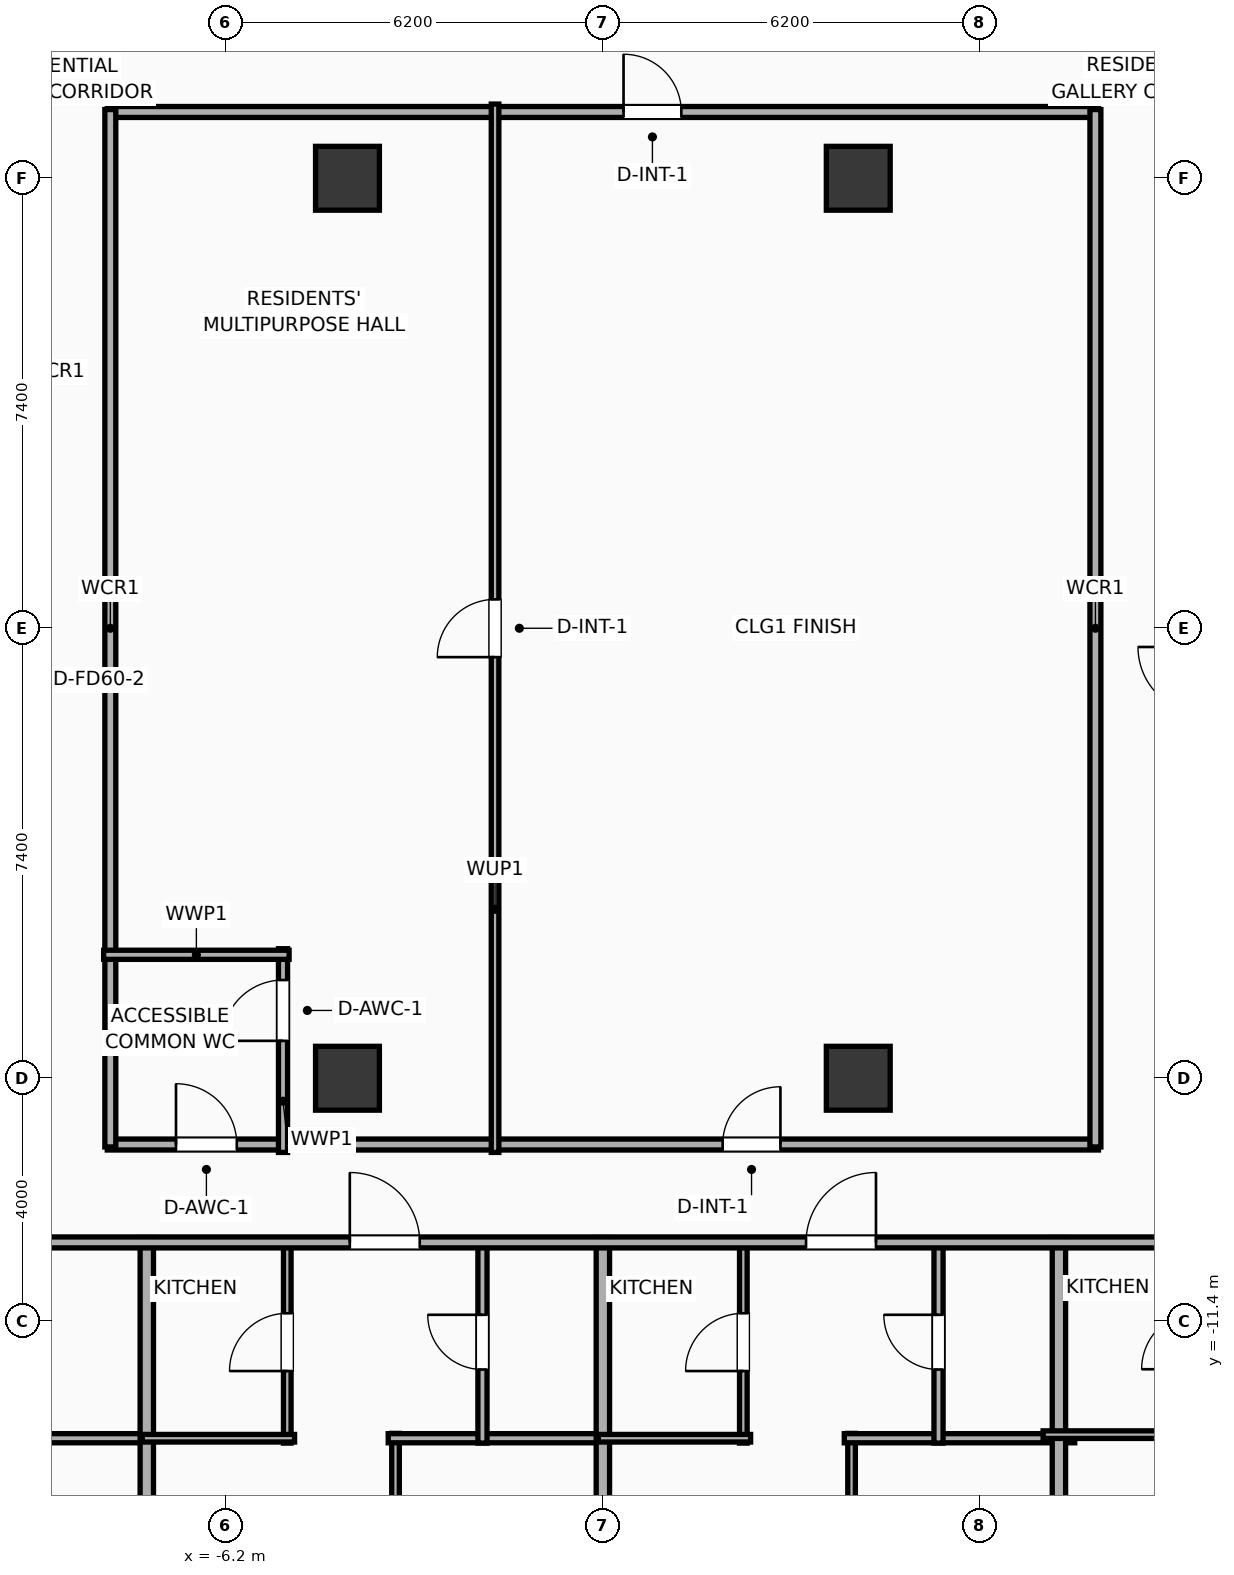
"""IFC4 building model, lengths in metres.
Left out: names, types, materials, properties, quantities, classifications, styles, units other than length and angle.
Written with IfcOpenShell. Run it as: python <this file> out.ifc"""

import sys

from ifc_helpers import new_model, si_unit, direction, frame, frame_2d, origin, origin_2d, place, context, subcontext, project, spatial, rectangle, extrude, element, fill, save


model = new_model("IFC4")
c1 = context("Model", 3, precision=1e-05, world=origin(), true_north=direction((0.0, 1.0)))
c2 = subcontext(c1, "Body", "Model", "MODEL_VIEW")
j1 = project(units=[si_unit("LENGTHUNIT", "METRE"), si_unit("PLANEANGLEUNIT", "RADIAN")], contexts=[c1])
p1 = place(None, origin())
s1 = spatial("IfcSite", under=j1, at=p1, CompositionType="ELEMENT")
p2 = place(p1, origin())
s2 = spatial("IfcBuilding", under=s1, at=p2, CompositionType="ELEMENT")
p3 = place(p2, frame((0.0, 0.0, 113.1)))
s3 = spatial("IfcBuildingStorey", under=s2, at=p3, CompositionType="ELEMENT", Elevation=113.1)
for number, where, z_axis, x_axis in (
    (1, (-4.2, -7.4, 0.0), (0.0, 0.0, 1.0), (1.0, 0.0, 0.0)),
    (2, (-4.2, 7.4, 0.0), (0.0, 0.0, 1.0), (1.0, 0.0, 0.0)),
    (3, (4.2, -7.4, 0.0), (0.0, 0.0, 1.0), (1.0, 0.0, 0.0)),
    (4, (4.2, 7.4, 0.0), (0.0, 0.0, 1.0), (1.0, 0.0, 0.0)),
):
    element("IfcColumn", number, at=place(p3, frame(where, z_axis=z_axis, x_axis=x_axis)), inside=s3, PredefinedType="COLUMN", context=c2, shape_type="SweptSolid", body=[
        extrude(rectangle(XDim=1.05, YDim=1.05, at=origin_2d()), origin(), (0.0, 0.0, 1.0), 3.9),
    ])
p4 = place(p3, frame((-8.15, 8.49, 0.0), z_axis=(0.0, 0.0, 1.0), x_axis=(1.0, 0.0, 0.0)))
e5 = element("IfcWall", 5, at=p4, inside=s3, PredefinedType="PARTITIONING", context=c2, shape_type="SweptSolid", body=[
    extrude(rectangle(XDim=16.3, YDim=0.18, at=frame_2d((8.15, 0.0))), origin(), (0.0, 0.0, 1.0), 3.65),
])
p5 = place(p4, frame((8.49, 0.0, 0.0)))
e6 = element("IfcOpeningElement", 6, at=p5, cuts=e5, PredefinedType="OPENING", context=c2, shape_type="SweptSolid", body=[
    extrude(rectangle(XDim=0.95, YDim=2.05, at=frame_2d((0.475, 1.025))), frame((0.0, 0.1, 0.0), z_axis=(0.0, -1.0, 0.0), x_axis=(1.0, 0.0, 0.0)), (0.0, 0.0, 1.0), 0.2),
])
p6 = place(p3, frame((-8.15, -8.49, 0.0), z_axis=(0.0, 0.0, 1.0), x_axis=(1.0, 0.0, 0.0)))
e7 = element("IfcWall", 7, at=p6, inside=s3, PredefinedType="PARTITIONING", context=c2, shape_type="SweptSolid", body=[
    extrude(rectangle(XDim=16.3, YDim=0.18, at=frame_2d((8.15, 0.0))), origin(), (0.0, 0.0, 1.0), 3.65),
])
p7 = place(p6, frame((1.13, 0.0, 0.0)))
e8 = element("IfcOpeningElement", 8, at=p7, cuts=e7, PredefinedType="OPENING", context=c2, shape_type="SweptSolid", body=[
    extrude(rectangle(XDim=1.0, YDim=2.05, at=frame_2d((0.5, 1.025))), frame((0.0, 0.1, 0.0), z_axis=(0.0, -1.0, 0.0), x_axis=(1.0, 0.0, 0.0)), (0.0, 0.0, 1.0), 0.2),
])
p8 = place(p6, frame((10.12, 0.0, 0.0)))
e9 = element("IfcOpeningElement", 9, at=p8, cuts=e7, PredefinedType="OPENING", context=c2, shape_type="SweptSolid", body=[
    extrude(rectangle(XDim=0.95, YDim=2.05, at=frame_2d((0.475, 1.025))), frame((0.0, 0.1, 0.0), z_axis=(0.0, -1.0, 0.0), x_axis=(1.0, 0.0, 0.0)), (0.0, 0.0, 1.0), 0.2),
])
for number, where, z_axis, x_axis in (
    (10, (-8.1, -8.53, 0.0), (0.0, 0.0, 1.0), (0.0, 1.0, 0.0)),
    (11, (8.1, -8.53, 0.0), (0.0, 0.0, 1.0), (0.0, 1.0, 0.0)),
):
    element("IfcWall", number, at=place(p3, frame(where, z_axis=z_axis, x_axis=x_axis)), inside=s3, PredefinedType="PARTITIONING", context=c2, shape_type="SweptSolid", body=[
        extrude(rectangle(XDim=17.06, YDim=0.18, at=frame_2d((8.53, 0.0))), origin(), (0.0, 0.0, 1.0), 3.65),
    ])
p9 = place(p3, frame((-5.26, -8.62, 0.0), z_axis=(0.0, 0.0, 1.0), x_axis=(0.0, 1.0, 0.0)))
e12 = element("IfcWall", 12, at=p9, inside=s3, PredefinedType="PLUMBINGWALL", context=c2, shape_type="SweptSolid", body=[
    extrude(rectangle(XDim=3.35, YDim=0.15, at=frame_2d((1.675, 0.0))), origin(), (0.0, 0.0, 1.0), 3.65),
])
p10 = place(p9, frame((1.835, 0.0, 0.0)))
e13 = element("IfcOpeningElement", 13, at=p10, cuts=e12, PredefinedType="OPENING", context=c2, shape_type="SweptSolid", body=[
    extrude(rectangle(XDim=1.0, YDim=2.05, at=frame_2d((0.5, 1.025))), frame((0.0, 0.085, 0.0), z_axis=(0.0, -1.0, 0.0), x_axis=(1.0, 0.0, 0.0)), (0.0, 0.0, 1.0), 0.17),
])
p11 = place(p3, frame((-8.21, -5.37, 0.0), z_axis=(0.0, 0.0, 1.0), x_axis=(1.0, 0.0, 0.0)))
e14 = element("IfcWall", 14, at=p11, inside=s3, PredefinedType="PLUMBINGWALL", context=c2, shape_type="SweptSolid", body=[
    extrude(rectangle(XDim=3.05, YDim=0.15, at=frame_2d((1.525, 0.0))), origin(), (0.0, 0.0, 1.0), 3.65),
])
p12 = place(p3, frame((-1.773, -8.62, 0.0), z_axis=(0.0, 0.0, 1.0), x_axis=(0.0, 1.0, 0.0)))
e15 = element("IfcWall", 15, at=p12, inside=s3, PredefinedType="PARTITIONING", context=c2, shape_type="SweptSolid", body=[
    extrude(rectangle(XDim=17.24, YDim=0.125, at=frame_2d((8.62, 0.0))), origin(), (0.0, 0.0, 1.0), 3.65),
])
p13 = place(p12, frame((8.145, 0.0, 0.0)))
e16 = element("IfcOpeningElement", 16, at=p13, cuts=e15, PredefinedType="OPENING", context=c2, shape_type="SweptSolid", body=[
    extrude(rectangle(XDim=0.95, YDim=2.05, at=frame_2d((0.475, 1.025))), frame((0.0, 0.073, 0.0), z_axis=(0.0, -1.0, 0.0), x_axis=(1.0, 0.0, 0.0)), (0.0, 0.0, 1.0), 0.145),
])
p14 = place(p3, frame((-11.03, -13.32, 0.0), z_axis=(0.0, 0.0, 1.0), x_axis=(1.0, 0.0, 0.0)))
e17 = element("IfcWall", 17, at=p14, inside=s3, PredefinedType="PLUMBINGWALL", context=c2, shape_type="SweptSolid", body=[
    extrude(rectangle(XDim=3.605, YDim=0.15, at=frame_2d((1.802, 0.0))), origin(), (0.0, 0.0, 1.0), 3.65),
])
p15 = place(p3, frame((-7.5, -20.41, 0.0), z_axis=(0.0, 0.0, 1.0), x_axis=(0.0, 1.0, 0.0)))
e18 = element("IfcWall", 18, at=p15, inside=s3, PredefinedType="PARTITIONING", context=c2, shape_type="SweptSolid", body=[
    extrude(rectangle(XDim=10.39, YDim=0.22, at=frame_2d((5.195, 0.0))), origin(), (0.0, 0.0, 1.0), 3.65),
])
p16 = place(p3, frame((-3.41, -20.56, 0.0), z_axis=(0.0, 0.0, 1.0), x_axis=(0.0, 1.0, 0.0)))
e19 = element("IfcWall", 19, at=p16, inside=s3, PredefinedType="PARTITIONING", context=c2, shape_type="SweptSolid", body=[
    extrude(rectangle(XDim=7.32, YDim=0.125, at=frame_2d((3.66, 0.0))), origin(), (0.0, 0.0, 1.0), 3.04),
])
p17 = place(p16, frame((5.113, 0.0, 0.0)))
e20 = element("IfcOpeningElement", 20, at=p17, cuts=e19, PredefinedType="OPENING", context=c2, shape_type="SweptSolid", body=[
    extrude(rectangle(XDim=0.9, YDim=2.05, at=frame_2d((0.45, 1.025))), frame((0.0, 0.073, 0.0), z_axis=(0.0, -1.0, 0.0), x_axis=(1.0, 0.0, 0.0)), (0.0, 0.0, 1.0), 0.145),
])
p18 = place(p3, frame((-3.53, -13.32, 0.0), z_axis=(0.0, 0.0, 1.0), x_axis=(1.0, 0.0, 0.0)))
e21 = element("IfcWall", 21, at=p18, inside=s3, PredefinedType="PLUMBINGWALL", context=c2, shape_type="SweptSolid", body=[
    extrude(rectangle(XDim=3.605, YDim=0.15, at=frame_2d((1.802, 0.0))), origin(), (0.0, 0.0, 1.0), 3.65),
])
p19 = place(p3, frame((-5.19, -13.4, 0.0), z_axis=(0.0, 0.0, 1.0), x_axis=(0.0, 1.0, 0.0)))
e22 = element("IfcWall", 22, at=p19, inside=s3, PredefinedType="PARTITIONING", context=c2, shape_type="SweptSolid", body=[
    extrude(rectangle(XDim=3.32, YDim=0.125, at=frame_2d((1.66, 0.0))), origin(), (0.0, 0.0, 1.0), 3.65),
])
p20 = place(p19, frame((1.185, 0.0, 0.0)))
e23 = element("IfcOpeningElement", 23, at=p20, cuts=e22, PredefinedType="OPENING", context=c2, shape_type="SweptSolid", body=[
    extrude(rectangle(XDim=0.95, YDim=2.05, at=frame_2d((0.475, 1.025))), frame((0.0, 0.073, 0.0), z_axis=(0.0, -1.0, 0.0), x_axis=(1.0, 0.0, 0.0)), (0.0, 0.0, 1.0), 0.145),
])
p21 = place(p3, frame((-7.575, -13.32, 0.0), z_axis=(0.0, 0.0, 1.0), x_axis=(1.0, 0.0, 0.0)))
e24 = element("IfcWall", 24, at=p21, inside=s3, PredefinedType="PARTITIONING", context=c2, shape_type="SweptSolid", body=[
    extrude(rectangle(XDim=2.505, YDim=0.125, at=frame_2d((1.252, 0.0))), origin(), (0.0, 0.0, 1.0), 3.65),
])
p22 = place(p3, frame((-1.98, -13.4, 0.0), z_axis=(0.0, 0.0, 1.0), x_axis=(0.0, 1.0, 0.0)))
e25 = element("IfcWall", 25, at=p22, inside=s3, PredefinedType="PLUMBINGWALL", context=c2, shape_type="SweptSolid", body=[
    extrude(rectangle(XDim=3.32, YDim=0.15, at=frame_2d((1.66, 0.0))), origin(), (0.0, 0.0, 1.0), 3.65),
])
p23 = place(p22, frame((1.21, 0.0, 0.0)))
e26 = element("IfcOpeningElement", 26, at=p23, cuts=e25, PredefinedType="OPENING", context=c2, shape_type="SweptSolid", body=[
    extrude(rectangle(XDim=0.9, YDim=2.05, at=frame_2d((0.45, 1.025))), frame((0.0, 0.085, 0.0), z_axis=(0.0, -1.0, 0.0), x_axis=(1.0, 0.0, 0.0)), (0.0, 0.0, 1.0), 0.17),
])
p24 = place(p3, frame((0.0, -20.41, 0.0), z_axis=(0.0, 0.0, 1.0), x_axis=(0.0, 1.0, 0.0)))
e27 = element("IfcWall", 27, at=p24, inside=s3, PredefinedType="PARTITIONING", context=c2, shape_type="SweptSolid", body=[
    extrude(rectangle(XDim=10.39, YDim=0.22, at=frame_2d((5.195, 0.0))), origin(), (0.0, 0.0, 1.0), 3.65),
])
p25 = place(p3, frame((4.09, -20.56, 0.0), z_axis=(0.0, 0.0, 1.0), x_axis=(0.0, 1.0, 0.0)))
e28 = element("IfcWall", 28, at=p25, inside=s3, PredefinedType="PARTITIONING", context=c2, shape_type="SweptSolid", body=[
    extrude(rectangle(XDim=7.32, YDim=0.125, at=frame_2d((3.66, 0.0))), origin(), (0.0, 0.0, 1.0), 3.65),
])
p26 = place(p25, frame((5.113, 0.0, 0.0)))
e29 = element("IfcOpeningElement", 29, at=p26, cuts=e28, PredefinedType="OPENING", context=c2, shape_type="SweptSolid", body=[
    extrude(rectangle(XDim=0.9, YDim=2.05, at=frame_2d((0.45, 1.025))), frame((0.0, 0.073, 0.0), z_axis=(0.0, -1.0, 0.0), x_axis=(1.0, 0.0, 0.0)), (0.0, 0.0, 1.0), 0.145),
])
p27 = place(p3, frame((3.97, -13.32, 0.0), z_axis=(0.0, 0.0, 1.0), x_axis=(1.0, 0.0, 0.0)))
e30 = element("IfcWall", 30, at=p27, inside=s3, PredefinedType="PLUMBINGWALL", context=c2, shape_type="SweptSolid", body=[
    extrude(rectangle(XDim=3.79, YDim=0.15, at=frame_2d((1.895, 0.0))), origin(), (0.0, 0.0, 1.0), 3.65),
])
p28 = place(p3, frame((2.31, -13.4, 0.0), z_axis=(0.0, 0.0, 1.0), x_axis=(0.0, 1.0, 0.0)))
e31 = element("IfcWall", 31, at=p28, inside=s3, PredefinedType="PARTITIONING", context=c2, shape_type="SweptSolid", body=[
    extrude(rectangle(XDim=3.32, YDim=0.125, at=frame_2d((1.66, 0.0))), origin(), (0.0, 0.0, 1.0), 3.65),
])
p29 = place(p28, frame((1.185, 0.0, 0.0)))
e32 = element("IfcOpeningElement", 32, at=p29, cuts=e31, PredefinedType="OPENING", context=c2, shape_type="SweptSolid", body=[
    extrude(rectangle(XDim=0.95, YDim=2.05, at=frame_2d((0.475, 1.025))), frame((0.0, 0.073, 0.0), z_axis=(0.0, -1.0, 0.0), x_axis=(1.0, 0.0, 0.0)), (0.0, 0.0, 1.0), 0.145),
])
p30 = place(p3, frame((-0.075, -13.32, 0.0), z_axis=(0.0, 0.0, 1.0), x_axis=(1.0, 0.0, 0.0)))
e33 = element("IfcWall", 33, at=p30, inside=s3, PredefinedType="PARTITIONING", context=c2, shape_type="SweptSolid", body=[
    extrude(rectangle(XDim=2.505, YDim=0.125, at=frame_2d((1.252, 0.0))), origin(), (0.0, 0.0, 1.0), 3.65),
])
p31 = place(p3, frame((5.52, -13.4, 0.0), z_axis=(0.0, 0.0, 1.0), x_axis=(0.0, 1.0, 0.0)))
e34 = element("IfcWall", 34, at=p31, inside=s3, PredefinedType="PLUMBINGWALL", context=c2, shape_type="SweptSolid", body=[
    extrude(rectangle(XDim=3.32, YDim=0.15, at=frame_2d((1.66, 0.0))), origin(), (0.0, 0.0, 1.0), 3.04),
])
p32 = place(p31, frame((1.21, 0.0, 0.0)))
e35 = element("IfcOpeningElement", 35, at=p32, cuts=e34, PredefinedType="OPENING", context=c2, shape_type="SweptSolid", body=[
    extrude(rectangle(XDim=0.9, YDim=2.05, at=frame_2d((0.45, 1.025))), frame((0.0, 0.085, 0.0), z_axis=(0.0, -1.0, 0.0), x_axis=(1.0, 0.0, 0.0)), (0.0, 0.0, 1.0), 0.17),
])
p33 = place(p3, frame((7.5, -20.41, 0.0), z_axis=(0.0, 0.0, 1.0), x_axis=(0.0, 1.0, 0.0)))
e36 = element("IfcWall", 36, at=p33, inside=s3, PredefinedType="PARTITIONING", context=c2, shape_type="SweptSolid", body=[
    extrude(rectangle(XDim=10.39, YDim=0.22, at=frame_2d((5.195, 0.0))), origin(), (0.0, 0.0, 1.0), 3.04),
])
p34 = place(p3, frame((7.24, -13.261, 0.0), z_axis=(0.0, 0.0, 1.0), x_axis=(1.0, 0.0, 0.0)))
e37 = element("IfcWall", 37, at=p34, inside=s3, PredefinedType="PARTITIONING", context=c2, shape_type="SweptSolid", body=[
    extrude(rectangle(XDim=2.69, YDim=0.125, at=frame_2d((1.345, 0.0))), origin(), (0.0, 0.0, 1.0), 3.65),
])
p35 = place(p3, frame((-29.21, -10.1, 0.0), z_axis=(0.0, 0.0, 1.0), x_axis=(1.0, 0.0, 0.0)))
e38 = element("IfcWall", 38, at=p35, inside=s3, PredefinedType="PARTITIONING", context=c2, shape_type="SweptSolid", body=[
    extrude(rectangle(XDim=62.42, YDim=0.18, at=frame_2d((31.21, 0.0))), origin(), (0.0, 0.0, 1.0), 3.65),
])
p36 = place(p35, frame((3.002, 0.0, 0.0)))
e39 = element("IfcOpeningElement", 39, at=p36, cuts=e38, PredefinedType="OPENING", context=c2, shape_type="SweptSolid", body=[
    extrude(rectangle(XDim=0.9, YDim=2.05, at=frame_2d((0.45, 1.025))), frame((0.0, 0.1, 0.0), z_axis=(0.0, -1.0, 0.0), x_axis=(1.0, 0.0, 0.0)), (0.0, 0.0, 1.0), 0.2),
])
p37 = place(p35, frame((10.049, 0.0, 0.0)))
e40 = element("IfcOpeningElement", 40, at=p37, cuts=e38, PredefinedType="OPENING", context=c2, shape_type="SweptSolid", body=[
    extrude(rectangle(XDim=1.15, YDim=2.05, at=frame_2d((0.575, 1.025))), frame((0.0, 0.1, 0.0), z_axis=(0.0, -1.0, 0.0), x_axis=(1.0, 0.0, 0.0)), (0.0, 0.0, 1.0), 0.2),
])
p38 = place(p35, frame((17.552, 0.0, 0.0)))
e41 = element("IfcOpeningElement", 41, at=p38, cuts=e38, PredefinedType="OPENING", context=c2, shape_type="SweptSolid", body=[
    extrude(rectangle(XDim=1.15, YDim=2.05, at=frame_2d((0.575, 1.025))), frame((0.0, 0.1, 0.0), z_axis=(0.0, -1.0, 0.0), x_axis=(1.0, 0.0, 0.0)), (0.0, 0.0, 1.0), 0.2),
])
p39 = place(p35, frame((25.048, 0.0, 0.0)))
e42 = element("IfcOpeningElement", 42, at=p39, cuts=e38, PredefinedType="OPENING", context=c2, shape_type="SweptSolid", body=[
    extrude(rectangle(XDim=1.15, YDim=2.05, at=frame_2d((0.575, 1.025))), frame((0.0, 0.1, 0.0), z_axis=(0.0, -1.0, 0.0), x_axis=(1.0, 0.0, 0.0)), (0.0, 0.0, 1.0), 0.2),
])
p40 = place(p35, frame((32.551, 0.0, 0.0)))
e43 = element("IfcOpeningElement", 43, at=p40, cuts=e38, PredefinedType="OPENING", context=c2, shape_type="SweptSolid", body=[
    extrude(rectangle(XDim=1.15, YDim=2.05, at=frame_2d((0.575, 1.025))), frame((0.0, 0.1, 0.0), z_axis=(0.0, -1.0, 0.0), x_axis=(1.0, 0.0, 0.0)), (0.0, 0.0, 1.0), 0.2),
])
p41 = place(p35, frame((40.048, 0.0, 0.0)))
e44 = element("IfcOpeningElement", 44, at=p41, cuts=e38, PredefinedType="OPENING", context=c2, shape_type="SweptSolid", body=[
    extrude(rectangle(XDim=1.15, YDim=2.05, at=frame_2d((0.575, 1.025))), frame((0.0, 0.1, 0.0), z_axis=(0.0, -1.0, 0.0), x_axis=(1.0, 0.0, 0.0)), (0.0, 0.0, 1.0), 0.2),
])
p42 = place(p35, frame((47.551, 0.0, 0.0)))
e45 = element("IfcOpeningElement", 45, at=p42, cuts=e38, PredefinedType="OPENING", context=c2, shape_type="SweptSolid", body=[
    extrude(rectangle(XDim=1.15, YDim=2.05, at=frame_2d((0.575, 1.025))), frame((0.0, 0.1, 0.0), z_axis=(0.0, -1.0, 0.0), x_axis=(1.0, 0.0, 0.0)), (0.0, 0.0, 1.0), 0.2),
])
p43 = place(p35, frame((57.064, 0.0, 0.0)))
e46 = element("IfcOpeningElement", 46, at=p43, cuts=e38, PredefinedType="OPENING", context=c2, shape_type="SweptSolid", body=[
    extrude(rectangle(XDim=1.15, YDim=2.05, at=frame_2d((0.575, 1.025))), frame((0.0, 0.1, 0.0), z_axis=(0.0, -1.0, 0.0), x_axis=(1.0, 0.0, 0.0)), (0.0, 0.0, 1.0), 0.2),
])
p44 = place(p5, origin())
e47 = element("IfcDoor", 47, at=p44, inside=s3, OperationType="SINGLE_SWING_LEFT", PredefinedType="DOOR", context=c2, shape_type="SweptSolid", body=[
    extrude(rectangle(XDim=0.95, YDim=2.05, at=frame_2d((0.475, 1.025))), frame((0.0, 0.025, 0.0), z_axis=(0.0, -1.0, 0.0), x_axis=(1.0, 0.0, 0.0)), (0.0, 0.0, 1.0), 0.05),
])
fill(e6, e47)
p45 = place(p7, origin())
e48 = element("IfcDoor", 48, at=p45, inside=s3, OperationType="SINGLE_SWING_LEFT", PredefinedType="DOOR", context=c2, shape_type="SweptSolid", body=[
    extrude(rectangle(XDim=1.0, YDim=2.05, at=frame_2d((0.5, 1.025))), frame((0.0, 0.025, 0.0), z_axis=(0.0, -1.0, 0.0), x_axis=(1.0, 0.0, 0.0)), (0.0, 0.0, 1.0), 0.05),
])
fill(e8, e48)
p46 = place(p8, origin())
e49 = element("IfcDoor", 49, at=p46, inside=s3, OperationType="SINGLE_SWING_RIGHT", PredefinedType="DOOR", context=c2, shape_type="SweptSolid", body=[
    extrude(rectangle(XDim=0.95, YDim=2.05, at=frame_2d((0.475, 1.025))), frame((0.0, 0.025, 0.0), z_axis=(0.0, -1.0, 0.0), x_axis=(1.0, 0.0, 0.0)), (0.0, 0.0, 1.0), 0.05),
])
fill(e9, e49)
p47 = place(p10, origin())
e50 = element("IfcDoor", 50, at=p47, inside=s3, OperationType="SINGLE_SWING_LEFT", PredefinedType="DOOR", context=c2, shape_type="SweptSolid", body=[
    extrude(rectangle(XDim=1.0, YDim=2.05, at=frame_2d((0.5, 1.025))), frame((0.0, 0.025, 0.0), z_axis=(0.0, -1.0, 0.0), x_axis=(1.0, 0.0, 0.0)), (0.0, 0.0, 1.0), 0.05),
])
fill(e13, e50)
p48 = place(p13, origin())
e51 = element("IfcDoor", 51, at=p48, inside=s3, OperationType="SINGLE_SWING_LEFT", PredefinedType="DOOR", context=c2, shape_type="SweptSolid", body=[
    extrude(rectangle(XDim=0.95, YDim=2.05, at=frame_2d((0.475, 1.025))), frame((0.0, 0.025, 0.0), z_axis=(0.0, -1.0, 0.0), x_axis=(1.0, 0.0, 0.0)), (0.0, 0.0, 1.0), 0.05),
])
fill(e16, e51)
p49 = place(p20, origin())
e52 = element("IfcDoor", 52, at=p49, inside=s3, OperationType="SINGLE_SWING_LEFT", PredefinedType="DOOR", context=c2, shape_type="SweptSolid", body=[
    extrude(rectangle(XDim=0.95, YDim=2.05, at=frame_2d((0.475, 1.025))), frame((0.0, 0.025, 0.0), z_axis=(0.0, -1.0, 0.0), x_axis=(1.0, 0.0, 0.0)), (0.0, 0.0, 1.0), 0.05),
])
fill(e23, e52)
p50 = place(p23, origin())
e53 = element("IfcDoor", 53, at=p50, inside=s3, OperationType="SINGLE_SWING_RIGHT", PredefinedType="DOOR", context=c2, shape_type="SweptSolid", body=[
    extrude(rectangle(XDim=0.9, YDim=2.05, at=frame_2d((0.45, 1.025))), frame((0.0, 0.025, 0.0), z_axis=(0.0, -1.0, 0.0), x_axis=(1.0, 0.0, 0.0)), (0.0, 0.0, 1.0), 0.05),
])
fill(e26, e53)
p51 = place(p29, origin())
e54 = element("IfcDoor", 54, at=p51, inside=s3, OperationType="SINGLE_SWING_LEFT", PredefinedType="DOOR", context=c2, shape_type="SweptSolid", body=[
    extrude(rectangle(XDim=0.95, YDim=2.05, at=frame_2d((0.475, 1.025))), frame((0.0, 0.025, 0.0), z_axis=(0.0, -1.0, 0.0), x_axis=(1.0, 0.0, 0.0)), (0.0, 0.0, 1.0), 0.05),
])
fill(e32, e54)
p52 = place(p32, origin())
e55 = element("IfcDoor", 55, at=p52, inside=s3, OperationType="SINGLE_SWING_RIGHT", PredefinedType="DOOR", context=c2, shape_type="SweptSolid", body=[
    extrude(rectangle(XDim=0.9, YDim=2.05, at=frame_2d((0.45, 1.025))), frame((0.0, 0.025, 0.0), z_axis=(0.0, -1.0, 0.0), x_axis=(1.0, 0.0, 0.0)), (0.0, 0.0, 1.0), 0.05),
])
fill(e35, e55)
p53 = place(p39, origin())
e56 = element("IfcDoor", 56, at=p53, inside=s3, OperationType="SINGLE_SWING_LEFT", PredefinedType="DOOR", context=c2, shape_type="SweptSolid", body=[
    extrude(rectangle(XDim=1.15, YDim=2.05, at=frame_2d((0.575, 1.025))), frame((0.0, 0.025, 0.0), z_axis=(0.0, -1.0, 0.0), x_axis=(1.0, 0.0, 0.0)), (0.0, 0.0, 1.0), 0.05),
])
fill(e42, e56)
p54 = place(p40, origin())
e57 = element("IfcDoor", 57, at=p54, inside=s3, OperationType="SINGLE_SWING_RIGHT", PredefinedType="DOOR", context=c2, shape_type="SweptSolid", body=[
    extrude(rectangle(XDim=1.15, YDim=2.05, at=frame_2d((0.575, 1.025))), frame((0.0, 0.025, 0.0), z_axis=(0.0, -1.0, 0.0), x_axis=(1.0, 0.0, 0.0)), (0.0, 0.0, 1.0), 0.05),
])
fill(e43, e57)
save(model, sys.argv[1])
